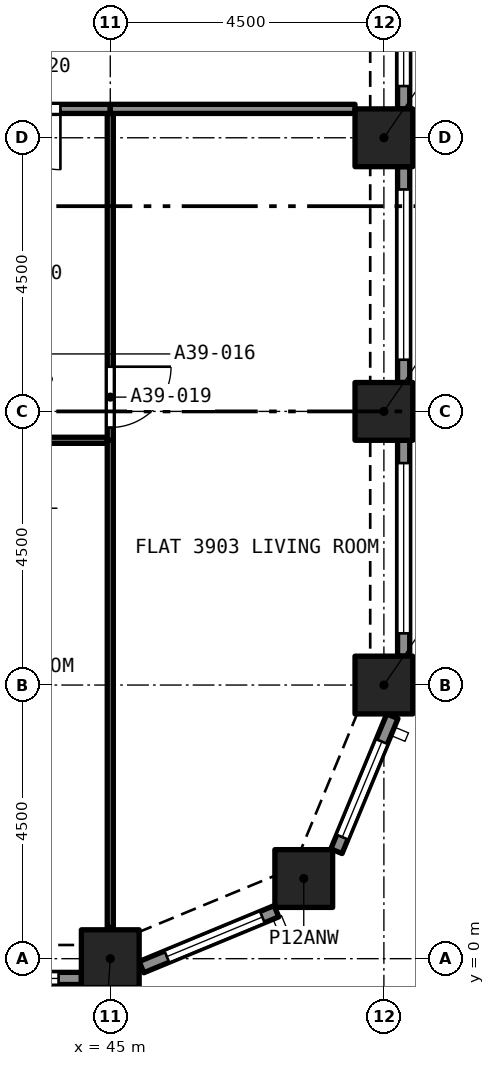
"""IFC4 building model, lengths in metres.
Left out: names, types, materials, properties, quantities, classifications, styles, units other than length and angle.
Written with IfcOpenShell. Run it as: python <this file> out.ifc"""

import sys

from ifc_helpers import new_model, si_unit, direction, frame, frame_2d, origin, origin_2d, place, context, subcontext, project, spatial, rectangle, extrude, element, fill, save


model = new_model("IFC4")
c1 = context("Model", 3, precision=1e-05, world=origin(), true_north=direction((0.0, 1.0)))
c2 = subcontext(c1, "Body", "Model", "MODEL_VIEW")
j1 = project(units=[si_unit("LENGTHUNIT", "METRE"), si_unit("PLANEANGLEUNIT", "RADIAN")], contexts=[c1])
p1 = place(None, origin())
s1 = spatial("IfcSite", under=j1, at=p1, CompositionType="ELEMENT")
p2 = place(p1, origin())
s2 = spatial("IfcBuilding", under=s1, at=p2, CompositionType="ELEMENT")
p3 = place(p2, frame((0.0, 0.0, 139.8)))
s3 = spatial("IfcBuildingStorey", under=s2, at=p3, CompositionType="ELEMENT", Elevation=139.8)
for number, where, z_axis, x_axis in (
    (1, (45.0, 0.0, 0.0), (0.0, 0.0, 1.0), (1.0, 0.0, 0.0)),
    (2, (48.182, 1.318, 0.0), (0.0, 0.0, 1.0), (1.0, 0.0, 0.0)),
    (3, (49.5, 4.5, 0.0), (0.0, 0.0, 1.0), (1.0, 0.0, 0.0)),
    (4, (49.5, 9.0, 0.0), (0.0, 0.0, 1.0), (1.0, 0.0, 0.0)),
    (5, (49.5, 13.5, 0.0), (0.0, 0.0, 1.0), (1.0, 0.0, 0.0)),
):
    element("IfcColumn", number, at=place(p3, frame(where, z_axis=z_axis, x_axis=x_axis)), inside=s3, PredefinedType="COLUMN", context=c2, shape_type="SweptSolid", body=[
        extrude(rectangle(XDim=0.95, YDim=0.95, at=origin_2d()), origin(), (0.0, 0.0, 1.0), 3.2),
    ])
p4 = place(p3, frame((44.525, -0.325, 0.0), z_axis=(0.0, 0.0, 1.0), x_axis=(-1.0, 0.0, 0.0)))
e6 = element("IfcWall", 6, at=p4, inside=s3, PredefinedType="SOLIDWALL", context=c2, shape_type="SweptSolid", body=[
    extrude(rectangle(XDim=3.55, YDim=0.2, at=frame_2d((1.775, 0.0))), origin(), (0.0, 0.0, 1.0), 3.2),
])
p5 = place(p4, frame((0.375, 0.0, 0.45)))
e7 = element("IfcOpeningElement", 7, at=p5, cuts=e6, PredefinedType="OPENING", context=c2, shape_type="SweptSolid", body=[
    extrude(rectangle(XDim=2.8, YDim=1.95, at=frame_2d((1.4, 0.975))), frame((0.0, 0.11, 0.0), z_axis=(0.0, -1.0, 0.0), x_axis=(1.0, 0.0, 0.0)), (0.0, 0.0, 1.0), 0.22),
])
p6 = place(p3, frame((47.733, 0.78, 0.0), z_axis=(0.0, 0.0, 1.0), x_axis=(-0.923880599843, -0.382680855588, 0.0)))
e8 = element("IfcWall", 8, at=p6, inside=s3, PredefinedType="SOLIDWALL", context=c2, shape_type="SweptSolid", body=[
    extrude(rectangle(XDim=2.403, YDim=0.2, at=frame_2d((1.201, 0.0))), origin(), (0.0, 0.0, 1.0), 3.2),
])
p7 = place(p6, frame((0.251, 0.0, 0.45)))
e9 = element("IfcOpeningElement", 9, at=p7, cuts=e8, PredefinedType="OPENING", context=c2, shape_type="SweptSolid", body=[
    extrude(rectangle(XDim=1.7, YDim=1.95, at=frame_2d((0.85, 0.975))), frame((0.0, 0.11, 0.0), z_axis=(0.0, -1.0, 0.0), x_axis=(1.0, 0.0, 0.0)), (0.0, 0.0, 1.0), 0.22),
])
p8 = place(p3, frame((49.639, 3.987, 0.0), z_axis=(0.0, 0.0, 1.0), x_axis=(-0.382680855588, -0.923880599843, 0.0)))
e10 = element("IfcWall", 10, at=p8, inside=s3, PredefinedType="SOLIDWALL", context=c2, shape_type="SweptSolid", body=[
    extrude(rectangle(XDim=2.403, YDim=0.2, at=frame_2d((1.201, 0.0))), origin(), (0.0, 0.0, 1.0), 3.2),
])
p9 = place(p8, frame((0.451, 0.0, 0.45)))
e11 = element("IfcOpeningElement", 11, at=p9, cuts=e10, PredefinedType="OPENING", context=c2, shape_type="SweptSolid", body=[
    extrude(rectangle(XDim=1.7, YDim=1.95, at=frame_2d((0.85, 0.975))), frame((0.0, 0.11, 0.0), z_axis=(0.0, -1.0, 0.0), x_axis=(1.0, 0.0, 0.0)), (0.0, 0.0, 1.0), 0.22),
])
p10 = place(p3, frame((49.825, 8.525, 0.0), z_axis=(0.0, 0.0, 1.0), x_axis=(0.0, -1.0, 0.0)))
e12 = element("IfcWall", 12, at=p10, inside=s3, PredefinedType="SOLIDWALL", context=c2, shape_type="SweptSolid", body=[
    extrude(rectangle(XDim=3.55, YDim=0.2, at=frame_2d((1.775, 0.0))), origin(), (0.0, 0.0, 1.0), 3.2),
])
p11 = place(p10, frame((0.375, 0.0, 0.45)))
e13 = element("IfcOpeningElement", 13, at=p11, cuts=e12, PredefinedType="OPENING", context=c2, shape_type="SweptSolid", body=[
    extrude(rectangle(XDim=2.8, YDim=1.95, at=frame_2d((1.4, 0.975))), frame((0.0, 0.11, 0.0), z_axis=(0.0, -1.0, 0.0), x_axis=(1.0, 0.0, 0.0)), (0.0, 0.0, 1.0), 0.22),
])
p12 = place(p3, frame((49.825, 13.025, 0.0), z_axis=(0.0, 0.0, 1.0), x_axis=(0.0, -1.0, 0.0)))
e14 = element("IfcWall", 14, at=p12, inside=s3, PredefinedType="SOLIDWALL", context=c2, shape_type="SweptSolid", body=[
    extrude(rectangle(XDim=3.55, YDim=0.2, at=frame_2d((1.775, 0.0))), origin(), (0.0, 0.0, 1.0), 3.2),
])
p13 = place(p12, frame((0.375, 0.0, 0.45)))
e15 = element("IfcOpeningElement", 15, at=p13, cuts=e14, PredefinedType="OPENING", context=c2, shape_type="SweptSolid", body=[
    extrude(rectangle(XDim=2.8, YDim=1.95, at=frame_2d((1.4, 0.975))), frame((0.0, 0.11, 0.0), z_axis=(0.0, -1.0, 0.0), x_axis=(1.0, 0.0, 0.0)), (0.0, 0.0, 1.0), 0.22),
])
p14 = place(p3, frame((49.825, 17.525, 0.0), z_axis=(0.0, 0.0, 1.0), x_axis=(0.0, -1.0, 0.0)))
e16 = element("IfcWall", 16, at=p14, inside=s3, PredefinedType="SOLIDWALL", context=c2, shape_type="SweptSolid", body=[
    extrude(rectangle(XDim=3.55, YDim=0.2, at=frame_2d((1.775, 0.0))), origin(), (0.0, 0.0, 1.0), 3.2),
])
p15 = place(p14, frame((0.375, 0.0, 0.45)))
e17 = element("IfcOpeningElement", 17, at=p15, cuts=e16, PredefinedType="OPENING", context=c2, shape_type="SweptSolid", body=[
    extrude(rectangle(XDim=2.8, YDim=1.95, at=frame_2d((1.4, 0.975))), frame((0.0, 0.11, 0.0), z_axis=(0.0, -1.0, 0.0), x_axis=(1.0, 0.0, 0.0)), (0.0, 0.0, 1.0), 0.22),
])
p16 = place(p3, frame((44.95, 8.525, 0.0), z_axis=(0.0, 0.0, 1.0), x_axis=(-1.0, 0.0, 0.0)))
e18 = element("IfcWall", 18, at=p16, inside=s3, PredefinedType="PARTITIONING", context=c2, shape_type="SweptSolid", body=[
    extrude(rectangle(XDim=4.35, YDim=0.1, at=frame_2d((2.175, 0.0))), origin(), (0.0, 0.0, 1.0), 2.9),
])
p17 = place(p16, frame((1.75, 0.0, 0.0)))
e19 = element("IfcOpeningElement", 19, at=p17, cuts=e18, PredefinedType="OPENING", context=c2, shape_type="SweptSolid", body=[
    extrude(rectangle(XDim=0.9, YDim=2.1, at=frame_2d((0.45, 1.05))), frame((0.0, 0.06, 0.0), z_axis=(0.0, -1.0, 0.0), x_axis=(1.0, 0.0, 0.0)), (0.0, 0.0, 1.0), 0.12),
])
p18 = place(p3, frame((45.0, 0.514, 0.0), z_axis=(0.0, 0.0, 1.0), x_axis=(0.0, 1.0, 0.0)))
e20 = element("IfcWall", 20, at=p18, inside=s3, PredefinedType="PARTITIONING", context=c2, shape_type="SweptSolid", body=[
    extrude(rectangle(XDim=8.011, YDim=0.1, at=frame_2d((4.005, 0.0))), origin(), (0.0, 0.0, 1.0), 2.9),
])
p19 = place(p3, frame((45.0, 13.9, 0.0), z_axis=(0.0, 0.0, 1.0), x_axis=(0.0, -1.0, 0.0)))
e21 = element("IfcWall", 21, at=p19, inside=s3, PredefinedType="PARTITIONING", context=c2, shape_type="SweptSolid", body=[
    extrude(rectangle(XDim=5.375, YDim=0.1, at=frame_2d((2.688, 0.0))), origin(), (0.0, 0.0, 1.0), 2.9),
])
p20 = place(p19, frame((4.165, 0.0, 0.0)))
e22 = element("IfcOpeningElement", 22, at=p20, cuts=e21, PredefinedType="OPENING", context=c2, shape_type="SweptSolid", body=[
    extrude(rectangle(XDim=1.0, YDim=2.1, at=frame_2d((0.5, 1.05))), frame((0.0, 0.06, 0.0), z_axis=(0.0, -1.0, 0.0), x_axis=(1.0, 0.0, 0.0)), (0.0, 0.0, 1.0), 0.12),
])
p21 = place(p3, frame((45.0, 13.975, 0.0), z_axis=(0.0, 0.0, 1.0), x_axis=(-1.0, 0.0, 0.0)))
e23 = element("IfcWall", 23, at=p21, inside=s3, PredefinedType="PARTITIONING", context=c2, shape_type="SweptSolid", body=[
    extrude(rectangle(XDim=1.95, YDim=0.15, at=frame_2d((0.975, 0.0))), origin(), (0.0, 0.0, 1.0), 2.9),
])
p22 = place(p21, frame((0.82, 0.0, 0.0)))
e24 = element("IfcOpeningElement", 24, at=p22, cuts=e23, PredefinedType="OPENING", context=c2, shape_type="SweptSolid", body=[
    extrude(rectangle(XDim=1.0, YDim=2.1, at=frame_2d((0.5, 1.05))), frame((0.0, 0.085, 0.0), z_axis=(0.0, -1.0, 0.0), x_axis=(1.0, 0.0, 0.0)), (0.0, 0.0, 1.0), 0.17),
])
p23 = place(p3, frame((45.0, 13.975, 0.0), z_axis=(0.0, 0.0, 1.0), x_axis=(1.0, 0.0, 0.0)))
e25 = element("IfcWall", 25, at=p23, inside=s3, PredefinedType="PARTITIONING", context=c2, shape_type="SweptSolid", body=[
    extrude(rectangle(XDim=4.025, YDim=0.15, at=frame_2d((2.012, 0.0))), origin(), (0.0, 0.0, 1.0), 2.9),
])
p24 = place(p5, origin())
e26 = element("IfcWindow", 26, at=p24, inside=s3, PartitioningType="SINGLE_PANEL", PredefinedType="WINDOW", context=c2, shape_type="SweptSolid", body=[
    extrude(rectangle(XDim=2.8, YDim=1.95, at=frame_2d((1.4, 0.975))), frame((0.0, 0.03, 0.0), z_axis=(0.0, -1.0, 0.0), x_axis=(1.0, 0.0, 0.0)), (0.0, 0.0, 1.0), 0.06),
])
fill(e7, e26)
p25 = place(p7, origin())
e27 = element("IfcWindow", 27, at=p25, inside=s3, PartitioningType="SINGLE_PANEL", PredefinedType="WINDOW", context=c2, shape_type="SweptSolid", body=[
    extrude(rectangle(XDim=1.7, YDim=1.95, at=frame_2d((0.85, 0.975))), frame((0.0, 0.03, 0.0), z_axis=(0.0, -1.0, 0.0), x_axis=(1.0, 0.0, 0.0)), (0.0, 0.0, 1.0), 0.06),
])
fill(e9, e27)
p26 = place(p9, origin())
e28 = element("IfcWindow", 28, at=p26, inside=s3, PartitioningType="SINGLE_PANEL", PredefinedType="WINDOW", context=c2, shape_type="SweptSolid", body=[
    extrude(rectangle(XDim=1.7, YDim=1.95, at=frame_2d((0.85, 0.975))), frame((0.0, 0.03, 0.0), z_axis=(0.0, -1.0, 0.0), x_axis=(1.0, 0.0, 0.0)), (0.0, 0.0, 1.0), 0.06),
])
fill(e11, e28)
p27 = place(p11, origin())
e29 = element("IfcWindow", 29, at=p27, inside=s3, PartitioningType="SINGLE_PANEL", PredefinedType="WINDOW", context=c2, shape_type="SweptSolid", body=[
    extrude(rectangle(XDim=2.8, YDim=1.95, at=frame_2d((1.4, 0.975))), frame((0.0, 0.03, 0.0), z_axis=(0.0, -1.0, 0.0), x_axis=(1.0, 0.0, 0.0)), (0.0, 0.0, 1.0), 0.06),
])
fill(e13, e29)
p28 = place(p13, origin())
e30 = element("IfcWindow", 30, at=p28, inside=s3, PartitioningType="SINGLE_PANEL", PredefinedType="WINDOW", context=c2, shape_type="SweptSolid", body=[
    extrude(rectangle(XDim=2.8, YDim=1.95, at=frame_2d((1.4, 0.975))), frame((0.0, 0.03, 0.0), z_axis=(0.0, -1.0, 0.0), x_axis=(1.0, 0.0, 0.0)), (0.0, 0.0, 1.0), 0.06),
])
fill(e15, e30)
p29 = place(p15, origin())
e31 = element("IfcWindow", 31, at=p29, inside=s3, PartitioningType="SINGLE_PANEL", PredefinedType="WINDOW", context=c2, shape_type="SweptSolid", body=[
    extrude(rectangle(XDim=2.8, YDim=1.95, at=frame_2d((1.4, 0.975))), frame((0.0, 0.03, 0.0), z_axis=(0.0, -1.0, 0.0), x_axis=(1.0, 0.0, 0.0)), (0.0, 0.0, 1.0), 0.06),
])
fill(e17, e31)
p30 = place(p20, origin())
e32 = element("IfcDoor", 32, at=p30, inside=s3, OperationType="SINGLE_SWING_RIGHT", PredefinedType="DOOR", context=c2, shape_type="SweptSolid", body=[
    extrude(rectangle(XDim=1.0, YDim=2.1, at=frame_2d((0.5, 1.05))), frame((0.0, 0.025, 0.0), z_axis=(0.0, -1.0, 0.0), x_axis=(1.0, 0.0, 0.0)), (0.0, 0.0, 1.0), 0.05),
])
fill(e22, e32)
p31 = place(p22, origin())
e33 = element("IfcDoor", 33, at=p31, inside=s3, OperationType="SINGLE_SWING_RIGHT", PredefinedType="DOOR", context=c2, shape_type="SweptSolid", body=[
    extrude(rectangle(XDim=1.0, YDim=2.1, at=frame_2d((0.5, 1.05))), frame((0.0, 0.025, 0.0), z_axis=(0.0, -1.0, 0.0), x_axis=(1.0, 0.0, 0.0)), (0.0, 0.0, 1.0), 0.05),
])
fill(e24, e33)
save(model, sys.argv[1])
